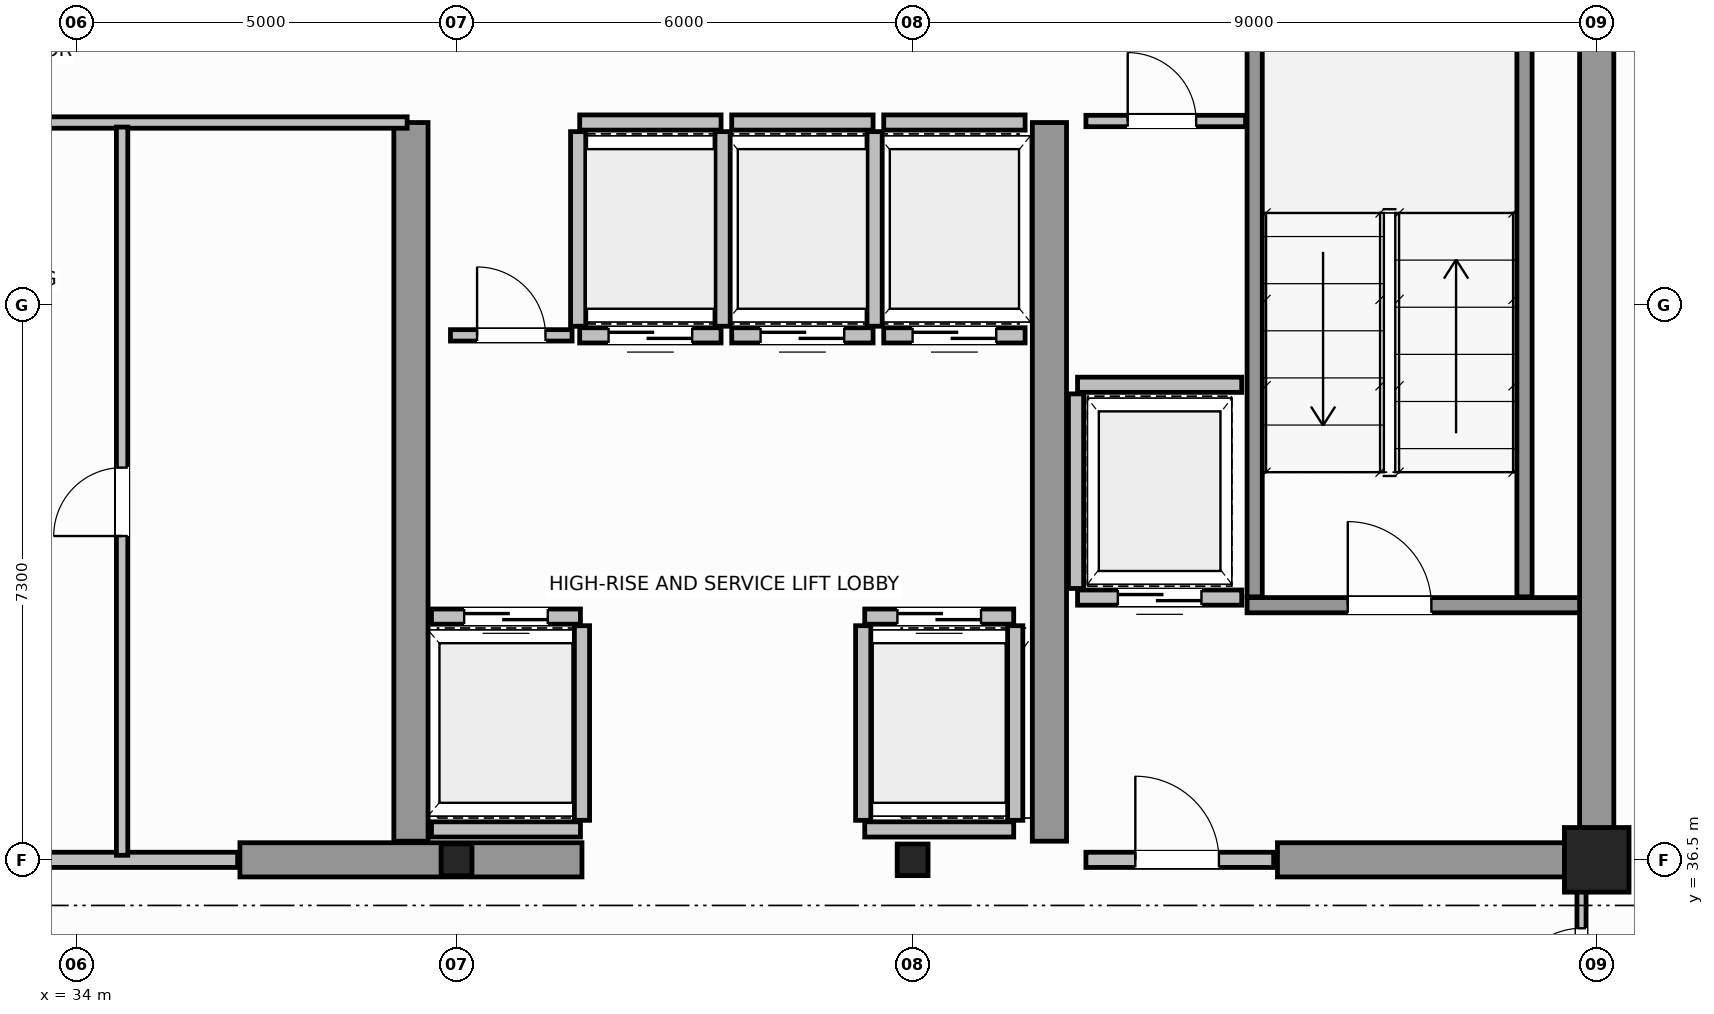
"""IFC4 building model, lengths in metres.
Left out: names, types, materials, properties, quantities, classifications, styles, units other than length and angle.
Written with IfcOpenShell. Run it as: python <this file> out.ifc"""

import sys

from ifc_helpers import new_model, si_unit, direction, frame, frame_2d, origin, origin_2d, place, context, subcontext, project, spatial, rectangle, i_section, extrude, source, transform, mapped, element, fill, save


model = new_model("IFC4")
c1 = context("Model", 3, precision=1e-05, world=origin(), true_north=direction((0.0, 1.0)))
c2 = subcontext(c1, "Body", "Model", "MODEL_VIEW")
j1 = project(units=[si_unit("LENGTHUNIT", "METRE"), si_unit("PLANEANGLEUNIT", "RADIAN")], contexts=[c1])
p1 = place(None, origin())
s1 = spatial("IfcSite", under=j1, at=p1, CompositionType="ELEMENT")
p2 = place(p1, origin())
s2 = spatial("IfcBuilding", under=s1, at=p2, CompositionType="ELEMENT")
p3 = place(p2, frame((0.0, 0.0, 280.2)))
s3 = spatial("IfcBuildingStorey", under=s2, at=p3, CompositionType="ELEMENT", Elevation=280.2)
m1 = source(origin(), c2, "Body", "SweptSolid", [
    extrude(i_section(OverallWidth=0.406, OverallDepth=0.416, WebThickness=0.03, FlangeThickness=0.042, FilletRadius=0.015, at=origin_2d()), origin(), (0.0, 0.0, 1.0), 3.8),
])
for number, where, z_axis, x_axis in (
    (1, (39.0, 36.5, 0.0), (0.0, 0.0, 1.0), (1.0, 0.0, 0.0)),
    (2, (45.0, 36.5, 0.0), (0.0, 0.0, 1.0), (1.0, 0.0, 0.0)),
):
    element("IfcColumn", number, at=place(p3, frame(where, z_axis=z_axis, x_axis=x_axis)), inside=s3, PredefinedType="COLUMN", context=c2, shape_type="MappedRepresentation", body=[
        mapped(m1, transform((0.0, 0.0, 0.0), scale=1.0)),
    ])
m2 = source(origin(), c2, "Body", "SweptSolid", [
    extrude(rectangle(XDim=0.85, YDim=0.85, at=origin_2d()), origin(), (0.0, 0.0, 1.0), 3.8),
])
p4 = place(p3, frame((54.0, 36.5, 0.0), z_axis=(0.0, 0.0, 1.0), x_axis=(1.0, 0.0, 0.0)))
e3 = element("IfcColumn", 3, at=p4, inside=s3, PredefinedType="COLUMN", context=c2, shape_type="MappedRepresentation", body=[
    mapped(m2, transform((0.0, 0.0, 0.0), scale=1.0)),
])
p5 = place(p3, frame((54.0, 36.5, 0.0), z_axis=(0.0, 0.0, 1.0), x_axis=(0.0, 1.0, 0.0)))
e4 = element("IfcWall", 4, at=p5, inside=s3, PredefinedType="SHEAR", context=c2, shape_type="SweptSolid", body=[
    extrude(rectangle(XDim=14.5, YDim=0.45, at=frame_2d((7.25, 0.0))), origin(), (0.0, 0.0, 1.0), 3.8),
])
p6 = place(p3, frame((36.15, 36.5, 0.0), z_axis=(0.0, 0.0, 1.0), x_axis=(1.0, 0.0, 0.0)))
e5 = element("IfcWall", 5, at=p6, inside=s3, PredefinedType="SHEAR", context=c2, shape_type="SweptSolid", body=[
    extrude(rectangle(XDim=4.5, YDim=0.45, at=frame_2d((2.25, 0.0))), origin(), (0.0, 0.0, 1.0), 3.8),
])
p7 = place(p3, frame((49.8, 36.5, 0.0), z_axis=(0.0, 0.0, 1.0), x_axis=(1.0, 0.0, 0.0)))
e6 = element("IfcWall", 6, at=p7, inside=s3, PredefinedType="SHEAR", context=c2, shape_type="SweptSolid", body=[
    extrude(rectangle(XDim=3.955, YDim=0.45, at=frame_2d((1.978, 0.0))), origin(), (0.0, 0.0, 1.0), 2.58),
])
for number, where, z_axis, x_axis in (
    (7, (38.4, 36.745, 0.0), (0.0, 0.0, 1.0), (0.0, 1.0, 0.0)),
    (8, (46.8, 36.745, 0.0), (0.0, 0.0, 1.0), (0.0, 1.0, 0.0)),
):
    element("IfcWall", number, at=place(p3, frame(where, z_axis=z_axis, x_axis=x_axis)), inside=s3, PredefinedType="SHEAR", context=c2, shape_type="SweptSolid", body=[
        extrude(rectangle(XDim=9.455, YDim=0.45, at=frame_2d((4.728, 0.0))), origin(), (0.0, 0.0, 1.0), 3.8),
    ])
p8 = place(p3, frame((49.4, 39.85, 0.0), z_axis=(0.0, 0.0, 1.0), x_axis=(1.0, 0.0, 0.0)))
e9 = element("IfcWall", 9, at=p8, inside=s3, PredefinedType="SOLIDWALL", context=c2, shape_type="SweptSolid", body=[
    extrude(rectangle(XDim=4.375, YDim=0.2, at=frame_2d((2.188, 0.0))), origin(), (0.0, 0.0, 1.0), 3.8),
])
p9 = place(p8, frame((1.325, 0.0, 0.0)))
e10 = element("IfcOpeningElement", 10, at=p9, cuts=e9, PredefinedType="OPENING", context=c2, shape_type="SweptSolid", body=[
    extrude(rectangle(XDim=1.1, YDim=2.15, at=frame_2d((0.55, 1.075))), frame((0.0, 0.11, 0.0), z_axis=(0.0, -1.0, 0.0), x_axis=(1.0, 0.0, 0.0)), (0.0, 0.0, 1.0), 0.22),
])
for number, where, z_axis, x_axis in (
    (11, (49.5, 39.96, 0.0), (0.0, 0.0, 1.0), (0.0, 1.0, 0.0)),
    (12, (53.05, 39.96, 0.0), (0.0, 0.0, 1.0), (0.0, 1.0, 0.0)),
):
    element("IfcWall", number, at=place(p3, frame(where, z_axis=z_axis, x_axis=x_axis)), inside=s3, PredefinedType="SOLIDWALL", context=c2, shape_type="SweptSolid", body=[
        extrude(rectangle(XDim=9.93, YDim=0.2, at=frame_2d((4.965, 0.0))), origin(), (0.0, 0.0, 1.0), 3.8),
    ])
p10 = place(p3, frame((47.28, 36.5, 0.0), z_axis=(0.0, 0.0, 1.0), x_axis=(1.0, 0.0, 0.0)))
e13 = element("IfcWall", 13, at=p10, inside=s3, PredefinedType="SOLIDWALL", context=c2, shape_type="SweptSolid", body=[
    extrude(rectangle(XDim=2.47, YDim=0.2, at=frame_2d((1.235, 0.0))), origin(), (0.0, 0.0, 1.0), 2.57),
])
p11 = place(p10, frame((0.65, 0.0, 0.0)))
e14 = element("IfcOpeningElement", 14, at=p11, cuts=e13, PredefinedType="OPENING", context=c2, shape_type="SweptSolid", body=[
    extrude(rectangle(XDim=1.1, YDim=2.15, at=frame_2d((0.55, 1.075))), frame((0.0, 0.11, 0.0), z_axis=(0.0, -1.0, 0.0), x_axis=(1.0, 0.0, 0.0)), (0.0, 0.0, 1.0), 0.22),
])
p12 = place(p3, frame((38.67, 39.7, 0.0), z_axis=(0.0, 0.0, 1.0), x_axis=(1.0, 0.0, 0.0)))
e15 = element("IfcWall", 15, at=p12, inside=s3, PredefinedType="SOLIDWALL", context=c2, shape_type="SweptSolid", body=[
    extrude(rectangle(XDim=1.96, YDim=0.2, at=frame_2d((0.98, 0.0))), origin(), (0.0, 0.0, 1.0), 3.58),
])
p13 = place(p12, frame((0.43, 0.0, 0.0)))
e16 = element("IfcOpeningElement", 16, at=p13, cuts=e15, PredefinedType="OPENING", context=c2, shape_type="SweptSolid", body=[
    extrude(rectangle(XDim=1.1, YDim=2.15, at=frame_2d((0.55, 1.075))), frame((0.0, 0.11, 0.0), z_axis=(0.0, -1.0, 0.0), x_axis=(1.0, 0.0, 0.0)), (0.0, 0.0, 1.0), 0.22),
])
p14 = place(p3, frame((38.67, 36.9, 0.0), z_axis=(0.0, 0.0, 1.0), x_axis=(1.0, 0.0, 0.0)))
e17 = element("IfcWall", 17, at=p14, inside=s3, PredefinedType="SOLIDWALL", context=c2, shape_type="SweptSolid", body=[
    extrude(rectangle(XDim=1.96, YDim=0.2, at=frame_2d((0.98, 0.0))), origin(), (0.0, 0.0, 1.0), 3.58),
])
p15 = place(p3, frame((40.65, 37.02, 0.0), z_axis=(0.0, 0.0, 1.0), x_axis=(0.0, 1.0, 0.0)))
e18 = element("IfcWall", 18, at=p15, inside=s3, PredefinedType="SOLIDWALL", context=c2, shape_type="SweptSolid", body=[
    extrude(rectangle(XDim=2.56, YDim=0.2, at=frame_2d((1.28, 0.0))), origin(), (0.0, 0.0, 1.0), 3.58),
])
p16 = place(p3, frame((44.37, 39.7, 0.0), z_axis=(0.0, 0.0, 1.0), x_axis=(1.0, 0.0, 0.0)))
e19 = element("IfcWall", 19, at=p16, inside=s3, PredefinedType="SOLIDWALL", context=c2, shape_type="SweptSolid", body=[
    extrude(rectangle(XDim=1.96, YDim=0.2, at=frame_2d((0.98, 0.0))), origin(), (0.0, 0.0, 1.0), 3.58),
])
p17 = place(p16, frame((0.43, 0.0, 0.0)))
e20 = element("IfcOpeningElement", 20, at=p17, cuts=e19, PredefinedType="OPENING", context=c2, shape_type="SweptSolid", body=[
    extrude(rectangle(XDim=1.1, YDim=2.15, at=frame_2d((0.55, 1.075))), frame((0.0, 0.11, 0.0), z_axis=(0.0, -1.0, 0.0), x_axis=(1.0, 0.0, 0.0)), (0.0, 0.0, 1.0), 0.22),
])
p18 = place(p3, frame((44.37, 36.9, 0.0), z_axis=(0.0, 0.0, 1.0), x_axis=(1.0, 0.0, 0.0)))
e21 = element("IfcWall", 21, at=p18, inside=s3, PredefinedType="SOLIDWALL", context=c2, shape_type="SweptSolid", body=[
    extrude(rectangle(XDim=1.96, YDim=0.2, at=frame_2d((0.98, 0.0))), origin(), (0.0, 0.0, 1.0), 2.57),
])
for number, where, z_axis, x_axis in (
    (22, (44.35, 37.02, 0.0), (0.0, 0.0, 1.0), (0.0, 1.0, 0.0)),
    (23, (46.35, 37.02, 0.0), (0.0, 0.0, 1.0), (0.0, 1.0, 0.0)),
):
    element("IfcWall", number, at=place(p3, frame(where, z_axis=z_axis, x_axis=x_axis)), inside=s3, PredefinedType="SOLIDWALL", context=c2, shape_type="SweptSolid", body=[
        extrude(rectangle(XDim=2.56, YDim=0.2, at=frame_2d((1.28, 0.0))), origin(), (0.0, 0.0, 1.0), 3.58),
    ])
p19 = place(p3, frame((40.62, 43.4, 0.0), z_axis=(0.0, 0.0, 1.0), x_axis=(1.0, 0.0, 0.0)))
e24 = element("IfcWall", 24, at=p19, inside=s3, PredefinedType="SOLIDWALL", context=c2, shape_type="SweptSolid", body=[
    extrude(rectangle(XDim=1.86, YDim=0.2, at=frame_2d((0.93, 0.0))), origin(), (0.0, 0.0, 1.0), 3.58),
])
p20 = place(p19, frame((0.38, 0.0, 0.0)))
e25 = element("IfcOpeningElement", 25, at=p20, cuts=e24, PredefinedType="OPENING", context=c2, shape_type="SweptSolid", body=[
    extrude(rectangle(XDim=1.1, YDim=2.15, at=frame_2d((0.55, 1.075))), frame((0.0, 0.11, 0.0), z_axis=(0.0, -1.0, 0.0), x_axis=(1.0, 0.0, 0.0)), (0.0, 0.0, 1.0), 0.22),
])
p21 = place(p3, frame((40.62, 46.2, 0.0), z_axis=(0.0, 0.0, 1.0), x_axis=(1.0, 0.0, 0.0)))
e26 = element("IfcWall", 26, at=p21, inside=s3, PredefinedType="SOLIDWALL", context=c2, shape_type="SweptSolid", body=[
    extrude(rectangle(XDim=1.86, YDim=0.2, at=frame_2d((0.93, 0.0))), origin(), (0.0, 0.0, 1.0), 3.58),
])
for number, where, z_axis, x_axis in (
    (27, (40.6, 43.52, 0.0), (0.0, 0.0, 1.0), (0.0, 1.0, 0.0)),
    (28, (42.5, 43.52, 0.0), (0.0, 0.0, 1.0), (0.0, 1.0, 0.0)),
):
    element("IfcWall", number, at=place(p3, frame(where, z_axis=z_axis, x_axis=x_axis)), inside=s3, PredefinedType="SOLIDWALL", context=c2, shape_type="SweptSolid", body=[
        extrude(rectangle(XDim=2.56, YDim=0.2, at=frame_2d((1.28, 0.0))), origin(), (0.0, 0.0, 1.0), 3.58),
    ])
p22 = place(p3, frame((42.62, 43.4, 0.0), z_axis=(0.0, 0.0, 1.0), x_axis=(1.0, 0.0, 0.0)))
e29 = element("IfcWall", 29, at=p22, inside=s3, PredefinedType="SOLIDWALL", context=c2, shape_type="SweptSolid", body=[
    extrude(rectangle(XDim=1.86, YDim=0.2, at=frame_2d((0.93, 0.0))), origin(), (0.0, 0.0, 1.0), 3.58),
])
p23 = place(p22, frame((0.38, 0.0, 0.0)))
e30 = element("IfcOpeningElement", 30, at=p23, cuts=e29, PredefinedType="OPENING", context=c2, shape_type="SweptSolid", body=[
    extrude(rectangle(XDim=1.1, YDim=2.15, at=frame_2d((0.55, 1.075))), frame((0.0, 0.11, 0.0), z_axis=(0.0, -1.0, 0.0), x_axis=(1.0, 0.0, 0.0)), (0.0, 0.0, 1.0), 0.22),
])
p24 = place(p3, frame((42.62, 46.2, 0.0), z_axis=(0.0, 0.0, 1.0), x_axis=(1.0, 0.0, 0.0)))
e31 = element("IfcWall", 31, at=p24, inside=s3, PredefinedType="SOLIDWALL", context=c2, shape_type="SweptSolid", body=[
    extrude(rectangle(XDim=1.86, YDim=0.2, at=frame_2d((0.93, 0.0))), origin(), (0.0, 0.0, 1.0), 3.58),
])
p25 = place(p3, frame((44.5, 43.52, 0.0), z_axis=(0.0, 0.0, 1.0), x_axis=(0.0, 1.0, 0.0)))
e32 = element("IfcWall", 32, at=p25, inside=s3, PredefinedType="SOLIDWALL", context=c2, shape_type="SweptSolid", body=[
    extrude(rectangle(XDim=2.56, YDim=0.2, at=frame_2d((1.28, 0.0))), origin(), (0.0, 0.0, 1.0), 3.58),
])
p26 = place(p3, frame((44.62, 43.4, 0.0), z_axis=(0.0, 0.0, 1.0), x_axis=(1.0, 0.0, 0.0)))
e33 = element("IfcWall", 33, at=p26, inside=s3, PredefinedType="SOLIDWALL", context=c2, shape_type="SweptSolid", body=[
    extrude(rectangle(XDim=1.86, YDim=0.2, at=frame_2d((0.93, 0.0))), origin(), (0.0, 0.0, 1.0), 3.58),
])
p27 = place(p26, frame((0.38, 0.0, 0.0)))
e34 = element("IfcOpeningElement", 34, at=p27, cuts=e33, PredefinedType="OPENING", context=c2, shape_type="SweptSolid", body=[
    extrude(rectangle(XDim=1.1, YDim=2.15, at=frame_2d((0.55, 1.075))), frame((0.0, 0.11, 0.0), z_axis=(0.0, -1.0, 0.0), x_axis=(1.0, 0.0, 0.0)), (0.0, 0.0, 1.0), 0.22),
])
p28 = place(p3, frame((44.62, 46.2, 0.0), z_axis=(0.0, 0.0, 1.0), x_axis=(1.0, 0.0, 0.0)))
e35 = element("IfcWall", 35, at=p28, inside=s3, PredefinedType="SOLIDWALL", context=c2, shape_type="SweptSolid", body=[
    extrude(rectangle(XDim=1.86, YDim=0.2, at=frame_2d((0.93, 0.0))), origin(), (0.0, 0.0, 1.0), 3.58),
])
p29 = place(p3, frame((47.17, 39.95, 0.0), z_axis=(0.0, 0.0, 1.0), x_axis=(1.0, 0.0, 0.0)))
e36 = element("IfcWall", 36, at=p29, inside=s3, PredefinedType="SOLIDWALL", context=c2, shape_type="SweptSolid", body=[
    extrude(rectangle(XDim=2.16, YDim=0.2, at=frame_2d((1.08, 0.0))), origin(), (0.0, 0.0, 1.0), 3.58),
])
p30 = place(p29, frame((0.53, 0.0, 0.0)))
e37 = element("IfcOpeningElement", 37, at=p30, cuts=e36, PredefinedType="OPENING", context=c2, shape_type="SweptSolid", body=[
    extrude(rectangle(XDim=1.1, YDim=2.15, at=frame_2d((0.55, 1.075))), frame((0.0, 0.11, 0.0), z_axis=(0.0, -1.0, 0.0), x_axis=(1.0, 0.0, 0.0)), (0.0, 0.0, 1.0), 0.22),
])
p31 = place(p3, frame((47.17, 42.75, 0.0), z_axis=(0.0, 0.0, 1.0), x_axis=(1.0, 0.0, 0.0)))
e38 = element("IfcWall", 38, at=p31, inside=s3, PredefinedType="SOLIDWALL", context=c2, shape_type="SweptSolid", body=[
    extrude(rectangle(XDim=2.16, YDim=0.2, at=frame_2d((1.08, 0.0))), origin(), (0.0, 0.0, 1.0), 3.58),
])
p32 = place(p3, frame((47.15, 40.07, 0.0), z_axis=(0.0, 0.0, 1.0), x_axis=(0.0, 1.0, 0.0)))
e39 = element("IfcWall", 39, at=p32, inside=s3, PredefinedType="SOLIDWALL", context=c2, shape_type="SweptSolid", body=[
    extrude(rectangle(XDim=2.56, YDim=0.2, at=frame_2d((1.28, 0.0))), origin(), (0.0, 0.0, 1.0), 3.58),
])
p33 = place(p3, frame((32.08, 36.5, 0.0), z_axis=(0.0, 0.0, 1.0), x_axis=(1.0, 0.0, 0.0)))
e40 = element("IfcWall", 40, at=p33, inside=s3, PredefinedType="SOLIDWALL", context=c2, shape_type="SweptSolid", body=[
    extrude(rectangle(XDim=4.04, YDim=0.2, at=frame_2d((2.02, 0.0))), origin(), (0.0, 0.0, 1.0), 3.12),
])
p34 = place(p33, frame((0.45, 0.0, 0.0)))
e41 = element("IfcOpeningElement", 41, at=p34, cuts=e40, PredefinedType="OPENING", context=c2, shape_type="SweptSolid", body=[
    extrude(rectangle(XDim=1.1, YDim=2.15, at=frame_2d((0.55, 1.075))), frame((0.0, 0.11, 0.0), z_axis=(0.0, -1.0, 0.0), x_axis=(1.0, 0.0, 0.0)), (0.0, 0.0, 1.0), 0.22),
])
p35 = place(p3, frame((29.85, 46.2, 0.0), z_axis=(0.0, 0.0, 1.0), x_axis=(1.0, 0.0, 0.0)))
e42 = element("IfcWall", 42, at=p35, inside=s3, PredefinedType="PARTITIONING", context=c2, shape_type="SweptSolid", body=[
    extrude(rectangle(XDim=8.5, YDim=0.15, at=frame_2d((4.25, 0.0))), origin(), (0.0, 0.0, 1.0), 3.58),
])
p36 = place(p3, frame((34.6, 36.56, 0.0), z_axis=(0.0, 0.0, 1.0), x_axis=(0.0, 1.0, 0.0)))
e43 = element("IfcWall", 43, at=p36, inside=s3, PredefinedType="PARTITIONING", context=c2, shape_type="SweptSolid", body=[
    extrude(rectangle(XDim=9.58, YDim=0.15, at=frame_2d((4.79, 0.0))), origin(), (0.0, 0.0, 1.0), 3.58),
])
p37 = place(p36, frame((4.2, 0.0, 0.0)))
e44 = element("IfcOpeningElement", 44, at=p37, cuts=e43, PredefinedType="OPENING", context=c2, shape_type="SweptSolid", body=[
    extrude(rectangle(XDim=0.9, YDim=2.1, at=frame_2d((0.45, 1.05))), frame((0.0, 0.085, 0.0), z_axis=(0.0, -1.0, 0.0), x_axis=(1.0, 0.0, 0.0)), (0.0, 0.0, 1.0), 0.17),
])
p38 = place(p3, frame((47.28, 46.22, 0.0), z_axis=(0.0, 0.0, 1.0), x_axis=(1.0, 0.0, 0.0)))
e45 = element("IfcWall", 45, at=p38, inside=s3, PredefinedType="PARTITIONING", context=c2, shape_type="SweptSolid", body=[
    extrude(rectangle(XDim=2.1, YDim=0.15, at=frame_2d((1.05, 0.0))), origin(), (0.0, 0.0, 1.0), 3.58),
])
p39 = place(p38, frame((0.55, 0.0, 0.0)))
e46 = element("IfcOpeningElement", 46, at=p39, cuts=e45, PredefinedType="OPENING", context=c2, shape_type="SweptSolid", body=[
    extrude(rectangle(XDim=0.9, YDim=2.1, at=frame_2d((0.45, 1.05))), frame((0.0, 0.085, 0.0), z_axis=(0.0, -1.0, 0.0), x_axis=(1.0, 0.0, 0.0)), (0.0, 0.0, 1.0), 0.17),
])
p40 = place(p3, frame((38.92, 43.4, 0.0), z_axis=(0.0, 0.0, 1.0), x_axis=(1.0, 0.0, 0.0)))
e47 = element("IfcWall", 47, at=p40, inside=s3, PredefinedType="PARTITIONING", context=c2, shape_type="SweptSolid", body=[
    extrude(rectangle(XDim=1.6, YDim=0.15, at=frame_2d((0.8, 0.0))), origin(), (0.0, 0.0, 1.0), 3.58),
])
p41 = place(p40, frame((0.35, 0.0, 0.0)))
e48 = element("IfcOpeningElement", 48, at=p41, cuts=e47, PredefinedType="OPENING", context=c2, shape_type="SweptSolid", body=[
    extrude(rectangle(XDim=0.9, YDim=2.1, at=frame_2d((0.45, 1.05))), frame((0.0, 0.085, 0.0), z_axis=(0.0, -1.0, 0.0), x_axis=(1.0, 0.0, 0.0)), (0.0, 0.0, 1.0), 0.17),
])
p42 = place(p3, frame((53.8, 34.0, 0.0), z_axis=(0.0, 0.0, 1.0), x_axis=(0.0, 1.0, 0.0)))
e49 = element("IfcWall", 49, at=p42, inside=s3, PredefinedType="PARTITIONING", context=c2, shape_type="SweptSolid", body=[
    extrude(rectangle(XDim=2.44, YDim=0.12, at=frame_2d((1.22, 0.0))), origin(), (0.0, 0.0, 1.0), 3.58),
])
p43 = place(p42, frame((0.7, 0.0, 0.0)))
e50 = element("IfcOpeningElement", 50, at=p43, cuts=e49, PredefinedType="OPENING", context=c2, shape_type="SweptSolid", body=[
    extrude(rectangle(XDim=0.9, YDim=2.15, at=frame_2d((0.45, 1.075))), frame((0.0, 0.07, 0.0), z_axis=(0.0, -1.0, 0.0), x_axis=(1.0, 0.0, 0.0)), (0.0, 0.0, 1.0), 0.14),
])
m3 = source(origin(), c2, "Body", "SweptSolid", [
    extrude(rectangle(XDim=1.1, YDim=2.15, at=frame_2d((0.55, 1.075))), frame((0.0, 0.025, 0.0), z_axis=(0.0, -1.0, 0.0), x_axis=(1.0, 0.0, 0.0)), (0.0, 0.0, 1.0), 0.05),
])
p44 = place(p9, origin())
e51 = element("IfcDoor", 51, at=p44, inside=s3, OperationType="SINGLE_SWING_RIGHT", PredefinedType="DOOR", context=c2, shape_type="MappedRepresentation", body=[
    mapped(m3, transform((0.0, 0.0, 0.0), scale=1.0)),
])
fill(e10, e51)
p45 = place(p11, origin())
e52 = element("IfcDoor", 52, at=p45, inside=s3, OperationType="SINGLE_SWING_LEFT", PredefinedType="DOOR", context=c2, shape_type="MappedRepresentation", body=[
    mapped(m3, transform((0.0, 0.0, 0.0), scale=1.0)),
])
fill(e14, e52)
p46 = place(p13, origin())
e53 = element("IfcDoor", 53, at=p46, inside=s3, OperationType="DOUBLE_DOOR_SLIDING", PredefinedType="DOOR", context=c2, shape_type="MappedRepresentation", body=[
    mapped(m3, transform((0.0, 0.0, 0.0), scale=1.0)),
])
fill(e16, e53)
p47 = place(p17, origin())
e54 = element("IfcDoor", 54, at=p47, inside=s3, OperationType="DOUBLE_DOOR_SLIDING", PredefinedType="DOOR", context=c2, shape_type="MappedRepresentation", body=[
    mapped(m3, transform((0.0, 0.0, 0.0), scale=1.0)),
])
fill(e20, e54)
p48 = place(p20, origin())
e55 = element("IfcDoor", 55, at=p48, inside=s3, OperationType="DOUBLE_DOOR_SLIDING", PredefinedType="DOOR", context=c2, shape_type="MappedRepresentation", body=[
    mapped(m3, transform((0.0, 0.0, 0.0), scale=1.0)),
])
fill(e25, e55)
p49 = place(p23, origin())
e56 = element("IfcDoor", 56, at=p49, inside=s3, OperationType="DOUBLE_DOOR_SLIDING", PredefinedType="DOOR", context=c2, shape_type="MappedRepresentation", body=[
    mapped(m3, transform((0.0, 0.0, 0.0), scale=1.0)),
])
fill(e30, e56)
p50 = place(p27, origin())
e57 = element("IfcDoor", 57, at=p50, inside=s3, OperationType="DOUBLE_DOOR_SLIDING", PredefinedType="DOOR", context=c2, shape_type="MappedRepresentation", body=[
    mapped(m3, transform((0.0, 0.0, 0.0), scale=1.0)),
])
fill(e34, e57)
p51 = place(p30, origin())
e58 = element("IfcDoor", 58, at=p51, inside=s3, OperationType="DOUBLE_DOOR_SLIDING", PredefinedType="DOOR", context=c2, shape_type="MappedRepresentation", body=[
    mapped(m3, transform((0.0, 0.0, 0.0), scale=1.0)),
])
fill(e37, e58)
m4 = source(origin(), c2, "Body", "SweptSolid", [
    extrude(rectangle(XDim=0.9, YDim=2.1, at=frame_2d((0.45, 1.05))), frame((0.0, 0.025, 0.0), z_axis=(0.0, -1.0, 0.0), x_axis=(1.0, 0.0, 0.0)), (0.0, 0.0, 1.0), 0.05),
])
p52 = place(p37, origin())
e59 = element("IfcDoor", 59, at=p52, inside=s3, OperationType="SINGLE_SWING_RIGHT", PredefinedType="DOOR", context=c2, shape_type="MappedRepresentation", body=[
    mapped(m4, transform((0.0, 0.0, 0.0), scale=1.0)),
])
fill(e44, e59)
p53 = place(p39, origin())
e60 = element("IfcDoor", 60, at=p53, inside=s3, OperationType="SINGLE_SWING_RIGHT", PredefinedType="DOOR", context=c2, shape_type="MappedRepresentation", body=[
    mapped(m4, transform((0.0, 0.0, 0.0), scale=1.0)),
])
fill(e46, e60)
p54 = place(p41, origin())
e61 = element("IfcDoor", 61, at=p54, inside=s3, OperationType="SINGLE_SWING_LEFT", PredefinedType="DOOR", context=c2, shape_type="MappedRepresentation", body=[
    mapped(m4, transform((0.0, 0.0, 0.0), scale=1.0)),
])
fill(e48, e61)
m5 = source(origin(), c2, "Body", "SweptSolid", [
    extrude(rectangle(XDim=0.9, YDim=2.15, at=frame_2d((0.45, 1.075))), frame((0.0, 0.025, 0.0), z_axis=(0.0, -1.0, 0.0), x_axis=(1.0, 0.0, 0.0)), (0.0, 0.0, 1.0), 0.05),
])
p55 = place(p43, origin())
e62 = element("IfcDoor", 62, at=p55, inside=s3, OperationType="SINGLE_SWING_RIGHT", PredefinedType="DOOR", context=c2, shape_type="MappedRepresentation", body=[
    mapped(m5, transform((0.0, 0.0, 0.0), scale=1.0)),
])
fill(e50, e62)
save(model, sys.argv[1])
